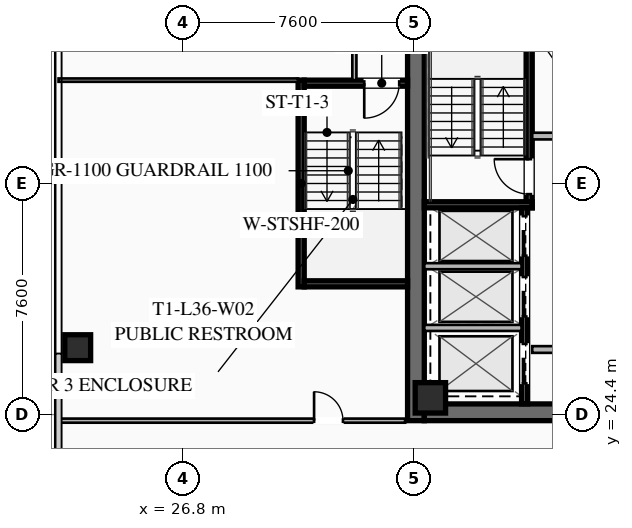
"""IFC4 building model, lengths in metres.
Left out: names, types, materials, properties, quantities, classifications, styles, units other than length and angle.
Written with IfcOpenShell. Run it as: python <this file> out.ifc"""

import sys

from ifc_helpers import new_model, si_unit, direction, frame, frame_2d, origin, origin_2d, place, context, subcontext, project, spatial, rectangle, hollow_rectangle, extrude, element, fill, save


model = new_model("IFC4")
c1 = context("Model", 3, precision=1e-05, world=origin(), true_north=direction((0.0, 1.0)))
c2 = subcontext(c1, "Body", "Model", "MODEL_VIEW")
j1 = project(units=[si_unit("LENGTHUNIT", "METRE"), si_unit("PLANEANGLEUNIT", "RADIAN")], contexts=[c1])
p1 = place(None, origin())
s1 = spatial("IfcSite", under=j1, at=p1, CompositionType="ELEMENT")
p2 = place(p1, origin())
s2 = spatial("IfcBuilding", under=s1, at=p2, CompositionType="ELEMENT")
p3 = place(p2, frame((0.0, 0.0, 135.7)))
s3 = spatial("IfcBuildingStorey", under=s2, at=p3, CompositionType="ELEMENT", Elevation=135.7)
p4 = place(p3, frame((34.475, 24.2, 0.0), z_axis=(0.0, 0.0, 1.0), x_axis=(0.0, 1.0, 0.0)))
e1 = element("IfcWall", 1, at=p4, inside=s3, PredefinedType="SHEAR", context=c2, shape_type="SweptSolid", body=[
    extrude(rectangle(XDim=15.6, YDim=0.55, at=frame_2d((7.8, 0.0))), origin(), (0.0, 0.0, 1.0), 3.55),
])
p5 = place(p3, frame((49.25, 24.475, 0.0), z_axis=(0.0, 0.0, 1.0), x_axis=(-1.0, 0.0, 0.0)))
e2 = element("IfcWall", 2, at=p5, inside=s3, PredefinedType="SHEAR", context=c2, shape_type="SweptSolid", body=[
    extrude(rectangle(XDim=14.5, YDim=0.55, at=frame_2d((7.25, 0.0))), origin(), (0.0, 0.0, 1.0), 3.55),
])
p6 = place(p5, frame((8.95, 0.0, 0.0)))
e3 = element("IfcOpeningElement", 3, at=p6, cuts=e2, PredefinedType="OPENING", context=c2, shape_type="SweptSolid", body=[
    extrude(rectangle(XDim=1.25, YDim=2.25, at=frame_2d((0.625, 1.125))), frame((0.0, 0.285, 0.0), z_axis=(0.0, -1.0, 0.0), x_axis=(1.0, 0.0, 0.0)), (0.0, 0.0, 1.0), 0.57),
])
p7 = place(p5, frame((3.9, 0.0, 0.0)))
e4 = element("IfcOpeningElement", 4, at=p7, cuts=e2, PredefinedType="OPENING", context=c2, shape_type="SweptSolid", body=[
    extrude(rectangle(XDim=1.25, YDim=2.25, at=frame_2d((0.625, 1.125))), frame((0.0, 0.285, 0.0), z_axis=(0.0, -1.0, 0.0), x_axis=(1.0, 0.0, 0.0)), (0.0, 0.0, 1.0), 0.57),
])
p8 = place(p3, frame((34.95, 24.95, 0.0), z_axis=(0.0, 0.0, 1.0), x_axis=(1.0, 0.0, 0.0)))
e5 = element("IfcColumn", 5, at=p8, inside=s3, PredefinedType="COLUMN", context=c2, shape_type="SweptSolid", body=[
    extrude(hollow_rectangle(XDim=1.0, YDim=1.0, WallThickness=0.04, at=origin_2d()), origin(), (0.0, 0.0, 1.0), 3.37),
])
p9 = place(p3, frame((23.35, 26.6, 0.0), z_axis=(0.0, 0.0, 1.0), x_axis=(1.0, 0.0, 0.0)))
e6 = element("IfcColumn", 6, at=p9, inside=s3, PredefinedType="COLUMN", context=c2, shape_type="SweptSolid", body=[
    extrude(hollow_rectangle(XDim=0.85, YDim=0.85, WallThickness=0.035, at=origin_2d()), origin(), (0.0, 0.0, 1.0), 3.37),
])
p10 = place(p3, frame((38.2, 31.2, 0.0), z_axis=(0.0, 0.0, 1.0), x_axis=(0.0, 1.0, 0.0)))
e7 = element("IfcWall", 7, at=p10, inside=s3, PredefinedType="SHEAR", context=c2, shape_type="SweptSolid", body=[
    extrude(rectangle(XDim=8.05, YDim=0.2, at=frame_2d((4.025, 0.0))), origin(), (0.0, 0.0, 1.0), 3.37),
])
p11 = place(p10, frame((0.45, 0.0, 0.0)))
e8 = element("IfcOpeningElement", 8, at=p11, cuts=e7, PredefinedType="OPENING", context=c2, shape_type="SweptSolid", body=[
    extrude(rectangle(XDim=1.15, YDim=2.2, at=frame_2d((0.575, 1.1))), frame((0.0, 0.11, 0.0), z_axis=(0.0, -1.0, 0.0), x_axis=(1.0, 0.0, 0.0)), (0.0, 0.0, 1.0), 0.22),
])
p12 = place(p3, frame((34.75, 31.3, 0.0), z_axis=(0.0, 0.0, 1.0), x_axis=(1.0, 0.0, 0.0)))
e9 = element("IfcWall", 9, at=p12, inside=s3, PredefinedType="SHEAR", context=c2, shape_type="SweptSolid", body=[
    extrude(rectangle(XDim=3.55, YDim=0.2, at=frame_2d((1.775, 0.0))), origin(), (0.0, 0.0, 1.0), 3.37),
])
p13 = place(p3, frame((38.3, 33.56, 0.0), z_axis=(0.0, 0.0, 1.0), x_axis=(1.0, 0.0, 0.0)))
e10 = element("IfcWall", 10, at=p13, inside=s3, PredefinedType="SOLIDWALL", context=c2, shape_type="SweptSolid", body=[
    extrude(rectangle(XDim=3.15, YDim=0.22, at=frame_2d((1.575, 0.0))), origin(), (0.0, 0.0, 1.0), 2.723),
])
p14 = place(p3, frame((38.3, 26.54, 0.0), z_axis=(0.0, 0.0, 1.0), x_axis=(1.0, 0.0, 0.0)))
e11 = element("IfcWall", 11, at=p14, inside=s3, PredefinedType="SOLIDWALL", context=c2, shape_type="SweptSolid", body=[
    extrude(rectangle(XDim=3.15, YDim=0.22, at=frame_2d((1.575, 0.0))), origin(), (0.0, 0.0, 1.0), 2.723),
])
p15 = place(p14, frame((0.95, 0.0, 0.0)))
e12 = element("IfcOpeningElement", 12, at=p15, cuts=e11, PredefinedType="OPENING", context=c2, shape_type="SweptSolid", body=[
    extrude(rectangle(XDim=1.25, YDim=2.25, at=frame_2d((0.625, 1.125))), frame((0.0, 0.12, 0.0), z_axis=(0.0, -1.0, 0.0), x_axis=(1.0, 0.0, 0.0)), (0.0, 0.0, 1.0), 0.24),
])
p16 = place(p3, frame((38.05, 24.75, 0.0), z_axis=(0.0, 0.0, 1.0), x_axis=(0.0, 1.0, 0.0)))
e13 = element("IfcWall", 13, at=p16, inside=s3, PredefinedType="SHEAR", context=c2, shape_type="SweptSolid", body=[
    extrude(rectangle(XDim=6.45, YDim=0.2, at=frame_2d((3.225, 0.0))), origin(), (0.0, 0.0, 1.0), 3.37),
])
p17 = place(p16, frame((4.875, 0.0, 0.0)))
e14 = element("IfcOpeningElement", 14, at=p17, cuts=e13, PredefinedType="OPENING", context=c2, shape_type="SweptSolid", body=[
    extrude(rectangle(XDim=1.3, YDim=2.25, at=frame_2d((0.65, 1.125))), frame((0.0, 0.11, 0.0), z_axis=(0.0, -1.0, 0.0), x_axis=(1.0, 0.0, 0.0)), (0.0, 0.0, 1.0), 0.22),
])
p18 = place(p16, frame((2.875, 0.0, 0.0)))
e15 = element("IfcOpeningElement", 15, at=p18, cuts=e13, PredefinedType="OPENING", context=c2, shape_type="SweptSolid", body=[
    extrude(rectangle(XDim=1.3, YDim=2.25, at=frame_2d((0.65, 1.125))), frame((0.0, 0.11, 0.0), z_axis=(0.0, -1.0, 0.0), x_axis=(1.0, 0.0, 0.0)), (0.0, 0.0, 1.0), 0.22),
])
p19 = place(p16, frame((0.675, 0.0, 0.0)))
e16 = element("IfcOpeningElement", 16, at=p19, cuts=e13, PredefinedType="OPENING", context=c2, shape_type="SweptSolid", body=[
    extrude(rectangle(XDim=1.3, YDim=2.25, at=frame_2d((0.65, 1.125))), frame((0.0, 0.11, 0.0), z_axis=(0.0, -1.0, 0.0), x_axis=(1.0, 0.0, 0.0)), (0.0, 0.0, 1.0), 0.22),
])
for number, where, z_axis, x_axis in (
    (17, (34.75, 27.25, 0.0), (0.0, 0.0, 1.0), (1.0, 0.0, 0.0)),
    (18, (34.75, 29.28, 0.0), (0.0, 0.0, 1.0), (1.0, 0.0, 0.0)),
):
    element("IfcWall", number, at=place(p3, frame(where, z_axis=z_axis, x_axis=x_axis)), inside=s3, PredefinedType="SOLIDWALL", context=c2, shape_type="SweptSolid", body=[
        extrude(rectangle(XDim=3.2, YDim=0.2, at=frame_2d((1.6, 0.0))), origin(), (0.0, 0.0, 1.0), 3.37),
    ])
p20 = place(p3, frame((30.7, 28.6, 0.0), z_axis=(0.0, 0.0, 1.0), x_axis=(0.0, 1.0, 0.0)))
e19 = element("IfcWall", 19, at=p20, inside=s3, PredefinedType="SHEAR", context=c2, shape_type="SweptSolid", body=[
    extrude(rectangle(XDim=6.8, YDim=0.2, at=frame_2d((3.4, 0.0))), origin(), (0.0, 0.0, 1.0), 3.37),
])
p21 = place(p3, frame((34.2, 35.3, 0.0), z_axis=(0.0, 0.0, 1.0), x_axis=(-1.0, 0.0, 0.0)))
e20 = element("IfcWall", 20, at=p21, inside=s3, PredefinedType="SHEAR", context=c2, shape_type="SweptSolid", body=[
    extrude(rectangle(XDim=3.4, YDim=0.2, at=frame_2d((1.7, 0.0))), origin(), (0.0, 0.0, 1.0), 3.37),
])
p22 = place(p21, frame((0.275, 0.0, 0.0)))
e21 = element("IfcOpeningElement", 21, at=p22, cuts=e20, PredefinedType="OPENING", context=c2, shape_type="SweptSolid", body=[
    extrude(rectangle(XDim=1.15, YDim=2.2, at=frame_2d((0.575, 1.1))), frame((0.0, 0.11, 0.0), z_axis=(0.0, -1.0, 0.0), x_axis=(1.0, 0.0, 0.0)), (0.0, 0.0, 1.0), 0.22),
])
p23 = place(p3, frame((30.8, 28.7, 0.0), z_axis=(0.0, 0.0, 1.0), x_axis=(1.0, 0.0, 0.0)))
e22 = element("IfcWall", 22, at=p23, inside=s3, PredefinedType="SHEAR", context=c2, shape_type="SweptSolid", body=[
    extrude(rectangle(XDim=3.4, YDim=0.2, at=frame_2d((1.7, 0.0))), origin(), (0.0, 0.0, 1.0), 3.37),
])
p24 = place(p3, frame((32.45, 35.4, 0.0), z_axis=(0.0, 0.0, 1.0), x_axis=(0.0, 1.0, 0.0)))
e23 = element("IfcWall", 23, at=p24, inside=s3, PredefinedType="PARTITIONING", context=c2, shape_type="SweptSolid", body=[
    extrude(rectangle(XDim=4.4, YDim=0.135, at=frame_2d((2.2, 0.0))), origin(), (0.0, 0.0, 1.0), 2.723),
])
p25 = place(p3, frame((22.72, 24.2, 0.0), z_axis=(0.0, 0.0, 1.0), x_axis=(1.0, 0.0, 0.0)))
e24 = element("IfcWall", 24, at=p25, inside=s3, PredefinedType="PARTITIONING", context=c2, shape_type="SweptSolid", body=[
    extrude(rectangle(XDim=11.4, YDim=0.135, at=frame_2d((5.7, 0.0))), origin(), (0.0, 0.0, 1.0), 2.723),
])
p26 = place(p25, frame((8.405, 0.0, 0.0)))
e25 = element("IfcOpeningElement", 25, at=p26, cuts=e24, PredefinedType="OPENING", context=c2, shape_type="SweptSolid", body=[
    extrude(rectangle(XDim=0.95, YDim=2.05, at=frame_2d((0.475, 1.025))), frame((0.0, 0.077, 0.0), z_axis=(0.0, -1.0, 0.0), x_axis=(1.0, 0.0, 0.0)), (0.0, 0.0, 1.0), 0.155),
])
p27 = place(p3, frame((30.6, 35.4, 0.0), z_axis=(0.0, 0.0, 1.0), x_axis=(-1.0, 0.0, 0.0)))
e26 = element("IfcWall", 26, at=p27, inside=s3, PredefinedType="PARTITIONING", context=c2, shape_type="SweptSolid", body=[
    extrude(rectangle(XDim=7.88, YDim=0.11, at=frame_2d((3.94, 0.0))), origin(), (0.0, 0.0, 1.0), 2.723),
])
p28 = place(p11, origin())
e27 = element("IfcDoor", 27, at=p28, inside=s3, OperationType="SINGLE_SWING_RIGHT", PredefinedType="DOOR", context=c2, shape_type="SweptSolid", body=[
    extrude(rectangle(XDim=1.15, YDim=2.2, at=frame_2d((0.575, 1.1))), frame((0.0, 0.025, 0.0), z_axis=(0.0, -1.0, 0.0), x_axis=(1.0, 0.0, 0.0)), (0.0, 0.0, 1.0), 0.05),
])
fill(e8, e27)
p29 = place(p22, origin())
e28 = element("IfcDoor", 28, at=p29, inside=s3, OperationType="SINGLE_SWING_RIGHT", PredefinedType="DOOR", context=c2, shape_type="SweptSolid", body=[
    extrude(rectangle(XDim=1.15, YDim=2.2, at=frame_2d((0.575, 1.1))), frame((0.0, 0.025, 0.0), z_axis=(0.0, -1.0, 0.0), x_axis=(1.0, 0.0, 0.0)), (0.0, 0.0, 1.0), 0.05),
])
fill(e21, e28)
p30 = place(p26, origin())
e29 = element("IfcDoor", 29, at=p30, inside=s3, OperationType="SINGLE_SWING_LEFT", PredefinedType="DOOR", context=c2, shape_type="SweptSolid", body=[
    extrude(rectangle(XDim=0.95, YDim=2.05, at=frame_2d((0.475, 1.025))), frame((0.0, 0.025, 0.0), z_axis=(0.0, -1.0, 0.0), x_axis=(1.0, 0.0, 0.0)), (0.0, 0.0, 1.0), 0.05),
])
fill(e25, e29)
p31 = place(p17, origin())
e30 = element("IfcDoor", 30, at=p31, inside=s3, OperationType="SLIDING_TO_LEFT", PredefinedType="DOOR", context=c2, shape_type="SweptSolid", body=[
    extrude(rectangle(XDim=1.3, YDim=2.25, at=frame_2d((0.65, 1.125))), frame((0.0, 0.025, 0.0), z_axis=(0.0, -1.0, 0.0), x_axis=(1.0, 0.0, 0.0)), (0.0, 0.0, 1.0), 0.05),
])
fill(e14, e30)
p32 = place(p18, origin())
e31 = element("IfcDoor", 31, at=p32, inside=s3, OperationType="SLIDING_TO_LEFT", PredefinedType="DOOR", context=c2, shape_type="SweptSolid", body=[
    extrude(rectangle(XDim=1.3, YDim=2.25, at=frame_2d((0.65, 1.125))), frame((0.0, 0.025, 0.0), z_axis=(0.0, -1.0, 0.0), x_axis=(1.0, 0.0, 0.0)), (0.0, 0.0, 1.0), 0.05),
])
fill(e15, e31)
p33 = place(p19, origin())
e32 = element("IfcDoor", 32, at=p33, inside=s3, OperationType="SLIDING_TO_LEFT", PredefinedType="DOOR", context=c2, shape_type="SweptSolid", body=[
    extrude(rectangle(XDim=1.3, YDim=2.25, at=frame_2d((0.65, 1.125))), frame((0.0, 0.025, 0.0), z_axis=(0.0, -1.0, 0.0), x_axis=(1.0, 0.0, 0.0)), (0.0, 0.0, 1.0), 0.05),
])
fill(e16, e32)
save(model, sys.argv[1])
